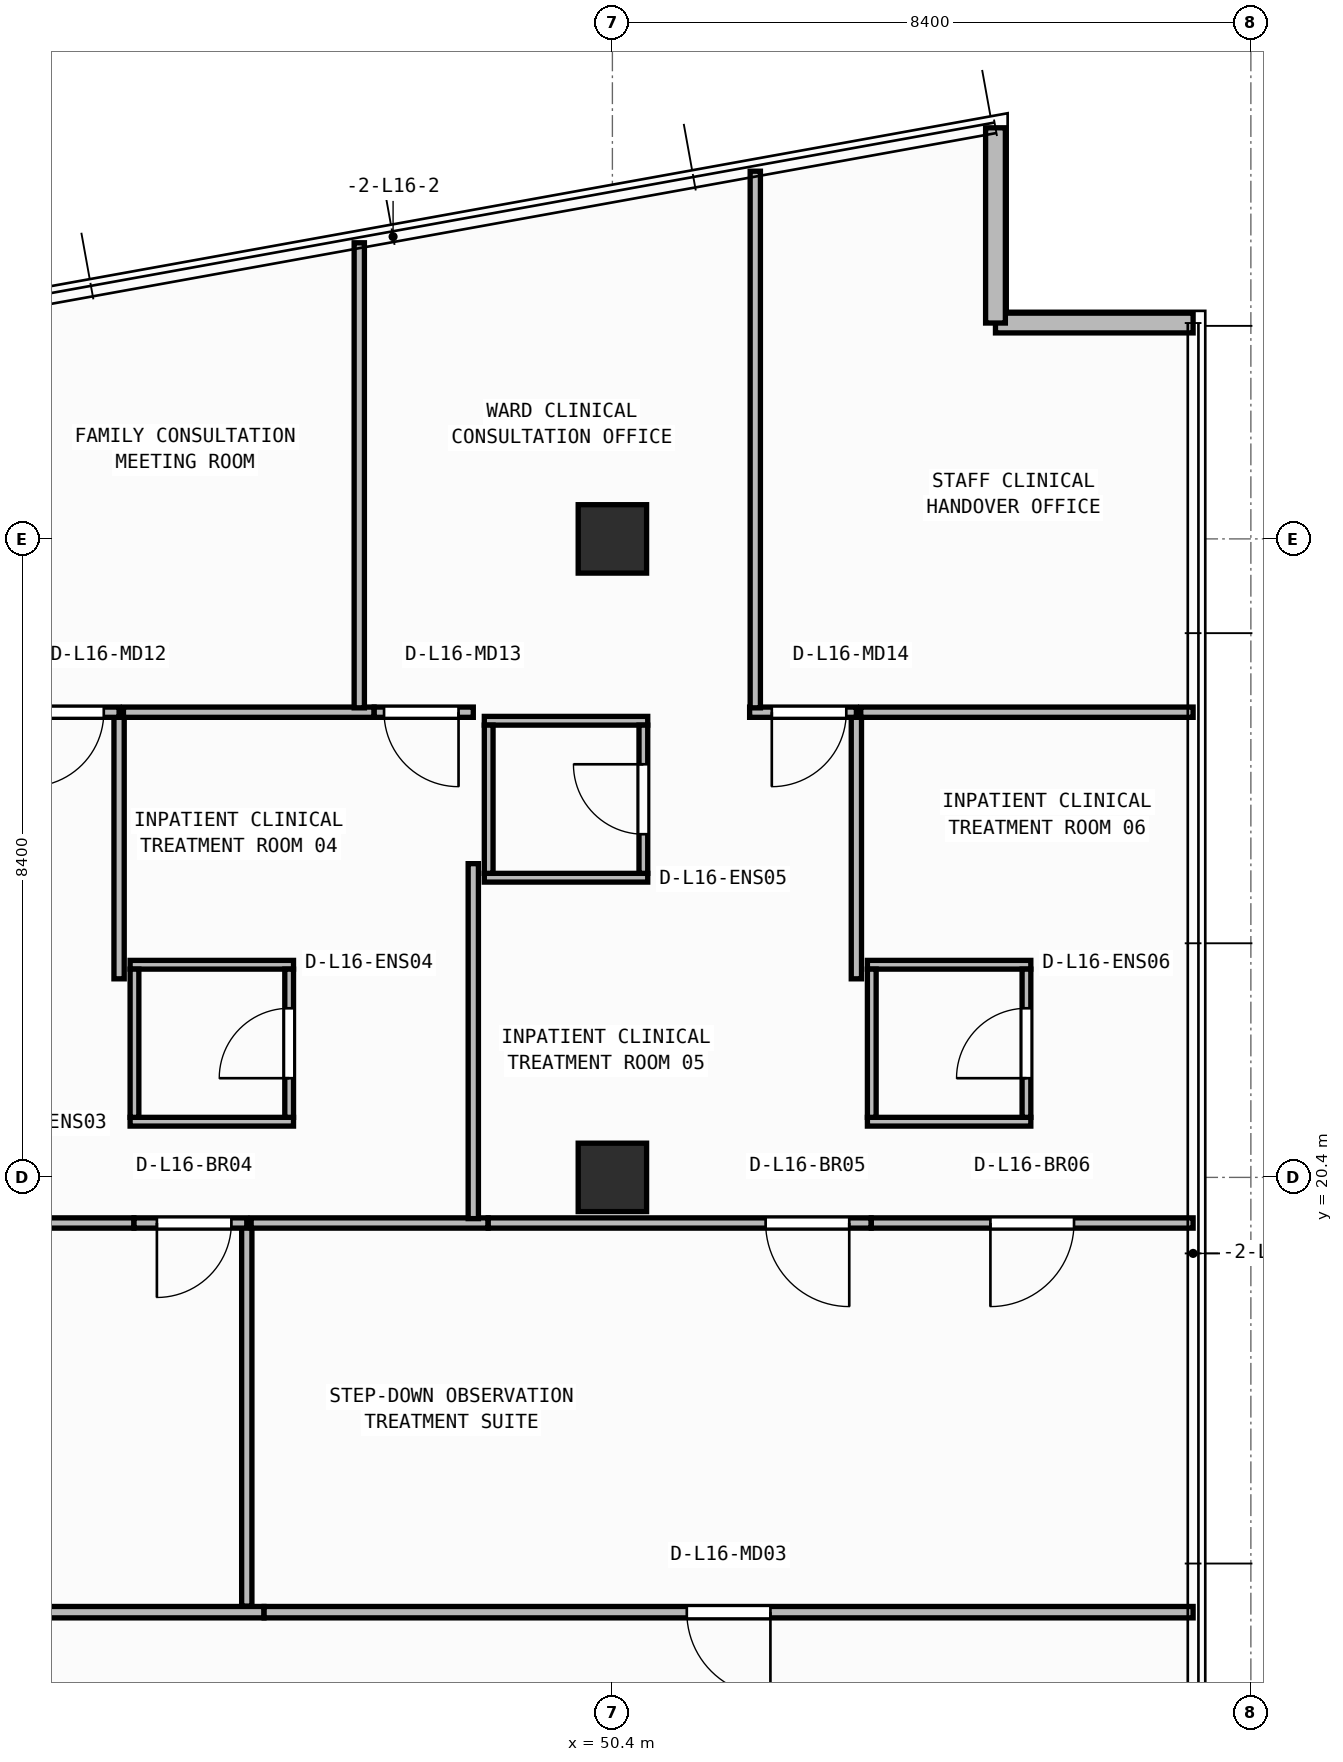
"""IFC4 building model, lengths in metres.
Left out: names, types, materials, properties, quantities, classifications, styles, units other than length and angle.
Written with IfcOpenShell. Run it as: python <this file> out.ifc"""

import sys

from ifc_helpers import new_model, si_unit, direction, frame, frame_2d, origin, origin_2d, place, context, subcontext, project, spatial, rectangle, extrude, element, fill, save


model = new_model("IFC4")
c1 = context("Model", 3, precision=1e-05, world=origin(), true_north=direction((0.0, 1.0)))
c2 = subcontext(c1, "Body", "Model", "MODEL_VIEW")
j1 = project(units=[si_unit("LENGTHUNIT", "METRE"), si_unit("PLANEANGLEUNIT", "RADIAN")], contexts=[c1])
p1 = place(None, origin())
s1 = spatial("IfcSite", under=j1, at=p1, CompositionType="ELEMENT")
p2 = place(p1, origin())
s2 = spatial("IfcBuilding", under=s1, at=p2, CompositionType="ELEMENT")
p3 = place(p2, frame((0.0, 0.0, 65.95)))
s3 = spatial("IfcBuildingStorey", under=s2, at=p3, CompositionType="ELEMENT", Elevation=65.95)
for number, where, z_axis, x_axis in (
    (1, (50.4, 20.4, 0.0), (0.0, 0.0, 1.0), (1.0, 0.0, 0.0)),
    (2, (50.4, 28.8, 0.0), (0.0, 0.0, 1.0), (1.0, 0.0, 0.0)),
):
    element("IfcColumn", number, at=place(p3, frame(where, z_axis=z_axis, x_axis=x_axis)), inside=s3, PredefinedType="COLUMN", context=c2, shape_type="SweptSolid", body=[
        extrude(rectangle(XDim=0.9, YDim=0.9, at=origin_2d()), origin(), (0.0, 0.0, 1.0), 3.95),
    ])
p4 = place(p3, frame((58.04, 31.64, 0.0), z_axis=(0.0, 0.0, 1.0), x_axis=(-1.0, 0.0, 0.0)))
e3 = element("IfcWall", 3, at=p4, inside=s3, PredefinedType="STANDARD", context=c2, shape_type="SweptSolid", body=[
    extrude(rectangle(XDim=2.6, YDim=0.26, at=frame_2d((1.3, 0.0))), origin(), (0.0, 0.0, 1.0), 3.71),
])
p5 = place(p3, frame((55.44, 31.64, 0.0), z_axis=(0.0, 0.0, 1.0), x_axis=(0.0, 1.0, 0.0)))
e4 = element("IfcWall", 4, at=p5, inside=s3, PredefinedType="STANDARD", context=c2, shape_type="SweptSolid", body=[
    extrude(rectangle(XDim=2.569, YDim=0.26, at=frame_2d((1.284, 0.0))), origin(), (0.0, 0.0, 1.0), 3.71),
])
for number, where, z_axis, x_axis in (
    (5, (44.055, 21.133, 0.0), (0.0, 0.0, 1.0), (1.0, 0.0, 0.0)),
    (6, (44.055, 23.198, 0.0), (0.0, 0.0, 1.0), (1.0, 0.0, 0.0)),
):
    element("IfcWall", number, at=place(p3, frame(where, z_axis=z_axis, x_axis=x_axis)), inside=s3, PredefinedType="PARTITIONING", context=c2, shape_type="SweptSolid", body=[
        extrude(rectangle(XDim=2.15, YDim=0.115, at=frame_2d((1.075, 0.0))), origin(), (0.0, 0.0, 1.0), 3.71),
    ])
p6 = place(p3, frame((44.113, 21.19, 0.0), z_axis=(0.0, 0.0, 1.0), x_axis=(0.0, 1.0, 0.0)))
e7 = element("IfcWall", 7, at=p6, inside=s3, PredefinedType="PARTITIONING", context=c2, shape_type="SweptSolid", body=[
    extrude(rectangle(XDim=1.95, YDim=0.115, at=frame_2d((0.975, 0.0))), origin(), (0.0, 0.0, 1.0), 3.71),
])
p7 = place(p3, frame((46.147, 21.19, 0.0), z_axis=(0.0, 0.0, 1.0), x_axis=(0.0, 1.0, 0.0)))
e8 = element("IfcWall", 8, at=p7, inside=s3, PredefinedType="PARTITIONING", context=c2, shape_type="SweptSolid", body=[
    extrude(rectangle(XDim=1.95, YDim=0.115, at=frame_2d((0.975, 0.0))), origin(), (0.0, 0.0, 1.0), 3.71),
])
p8 = place(p7, frame((0.515, 0.0, 0.0)))
e9 = element("IfcOpeningElement", 9, at=p8, cuts=e8, PredefinedType="OPENING", context=c2, shape_type="SweptSolid", body=[
    extrude(rectangle(XDim=0.92, YDim=2.1, at=frame_2d((0.46, 1.05))), frame((0.0, 0.067, 0.0), z_axis=(0.0, -1.0, 0.0), x_axis=(1.0, 0.0, 0.0)), (0.0, 0.0, 1.0), 0.135),
])
p9 = place(p3, frame((48.715, 24.343, 0.0), z_axis=(0.0, 0.0, 1.0), x_axis=(1.0, 0.0, 0.0)))
e10 = element("IfcWall", 10, at=p9, inside=s3, PredefinedType="PARTITIONING", context=c2, shape_type="SweptSolid", body=[
    extrude(rectangle(XDim=2.15, YDim=0.115, at=frame_2d((1.075, 0.0))), origin(), (0.0, 0.0, 1.0), 3.378),
])
p10 = place(p3, frame((48.715, 26.407, 0.0), z_axis=(0.0, 0.0, 1.0), x_axis=(1.0, 0.0, 0.0)))
e11 = element("IfcWall", 11, at=p10, inside=s3, PredefinedType="PARTITIONING", context=c2, shape_type="SweptSolid", body=[
    extrude(rectangle(XDim=2.15, YDim=0.115, at=frame_2d((1.075, 0.0))), origin(), (0.0, 0.0, 1.0), 3.71),
])
p11 = place(p3, frame((48.772, 24.4, 0.0), z_axis=(0.0, 0.0, 1.0), x_axis=(0.0, 1.0, 0.0)))
e12 = element("IfcWall", 12, at=p11, inside=s3, PredefinedType="PARTITIONING", context=c2, shape_type="SweptSolid", body=[
    extrude(rectangle(XDim=1.95, YDim=0.115, at=frame_2d((0.975, 0.0))), origin(), (0.0, 0.0, 1.0), 3.71),
])
p12 = place(p3, frame((50.808, 24.4, 0.0), z_axis=(0.0, 0.0, 1.0), x_axis=(0.0, 1.0, 0.0)))
e13 = element("IfcWall", 13, at=p12, inside=s3, PredefinedType="PARTITIONING", context=c2, shape_type="SweptSolid", body=[
    extrude(rectangle(XDim=1.95, YDim=0.115, at=frame_2d((0.975, 0.0))), origin(), (0.0, 0.0, 1.0), 3.073),
])
p13 = place(p12, frame((0.515, 0.0, 0.0)))
e14 = element("IfcOpeningElement", 14, at=p13, cuts=e13, PredefinedType="OPENING", context=c2, shape_type="SweptSolid", body=[
    extrude(rectangle(XDim=0.92, YDim=2.1, at=frame_2d((0.46, 1.05))), frame((0.0, 0.067, 0.0), z_axis=(0.0, -1.0, 0.0), x_axis=(1.0, 0.0, 0.0)), (0.0, 0.0, 1.0), 0.135),
])
for number, where, z_axis, x_axis in (
    (15, (53.755, 21.133, 0.0), (0.0, 0.0, 1.0), (1.0, 0.0, 0.0)),
    (16, (53.755, 23.198, 0.0), (0.0, 0.0, 1.0), (1.0, 0.0, 0.0)),
):
    element("IfcWall", number, at=place(p3, frame(where, z_axis=z_axis, x_axis=x_axis)), inside=s3, PredefinedType="PARTITIONING", context=c2, shape_type="SweptSolid", body=[
        extrude(rectangle(XDim=2.15, YDim=0.115, at=frame_2d((1.075, 0.0))), origin(), (0.0, 0.0, 1.0), 3.71),
    ])
p14 = place(p3, frame((53.812, 21.19, 0.0), z_axis=(0.0, 0.0, 1.0), x_axis=(0.0, 1.0, 0.0)))
e17 = element("IfcWall", 17, at=p14, inside=s3, PredefinedType="PARTITIONING", context=c2, shape_type="SweptSolid", body=[
    extrude(rectangle(XDim=1.95, YDim=0.115, at=frame_2d((0.975, 0.0))), origin(), (0.0, 0.0, 1.0), 3.71),
])
p15 = place(p3, frame((55.847, 21.19, 0.0), z_axis=(0.0, 0.0, 1.0), x_axis=(0.0, 1.0, 0.0)))
e18 = element("IfcWall", 18, at=p15, inside=s3, PredefinedType="PARTITIONING", context=c2, shape_type="SweptSolid", body=[
    extrude(rectangle(XDim=1.95, YDim=0.115, at=frame_2d((0.975, 0.0))), origin(), (0.0, 0.0, 1.0), 3.71),
])
p16 = place(p15, frame((0.515, 0.0, 0.0)))
e19 = element("IfcOpeningElement", 19, at=p16, cuts=e18, PredefinedType="OPENING", context=c2, shape_type="SweptSolid", body=[
    extrude(rectangle(XDim=0.92, YDim=2.1, at=frame_2d((0.46, 1.05))), frame((0.0, 0.067, 0.0), z_axis=(0.0, -1.0, 0.0), x_axis=(1.0, 0.0, 0.0)), (0.0, 0.0, 1.0), 0.135),
])
p17 = place(p3, frame((45.816, 14.68, 0.0), z_axis=(0.0, 0.0, 1.0), x_axis=(-1.0, 0.0, 0.0)))
e20 = element("IfcWall", 20, at=p17, inside=s3, PredefinedType="PARTITIONING", context=c2, shape_type="SweptSolid", body=[
    extrude(rectangle(XDim=16.062, YDim=0.15, at=frame_2d((8.031, 0.0))), origin(), (0.0, 0.0, 1.0), 3.71),
])
p18 = place(p17, frame((7.481, 0.0, 0.0)))
e21 = element("IfcOpeningElement", 21, at=p18, cuts=e20, PredefinedType="OPENING", context=c2, shape_type="SweptSolid", body=[
    extrude(rectangle(XDim=1.1, YDim=2.1, at=frame_2d((0.55, 1.05))), frame((0.0, 0.085, 0.0), z_axis=(0.0, -1.0, 0.0), x_axis=(1.0, 0.0, 0.0)), (0.0, 0.0, 1.0), 0.17),
])
p19 = place(p3, frame((58.04, 14.68, 0.0), z_axis=(0.0, 0.0, 1.0), x_axis=(-1.0, 0.0, 0.0)))
e22 = element("IfcWall", 22, at=p19, inside=s3, PredefinedType="PARTITIONING", context=c2, shape_type="SweptSolid", body=[
    extrude(rectangle(XDim=12.222, YDim=0.15, at=frame_2d((6.111, 0.0))), origin(), (0.0, 0.0, 1.0), 3.71),
])
p20 = place(p19, frame((5.561, 0.0, 0.0)))
e23 = element("IfcOpeningElement", 23, at=p20, cuts=e22, PredefinedType="OPENING", context=c2, shape_type="SweptSolid", body=[
    extrude(rectangle(XDim=1.1, YDim=2.1, at=frame_2d((0.55, 1.05))), frame((0.0, 0.085, 0.0), z_axis=(0.0, -1.0, 0.0), x_axis=(1.0, 0.0, 0.0)), (0.0, 0.0, 1.0), 0.17),
])
p21 = place(p3, frame((45.59, 14.76, 0.0), z_axis=(0.0, 0.0, 1.0), x_axis=(0.0, 1.0, 0.0)))
e24 = element("IfcWall", 24, at=p21, inside=s3, PredefinedType="PARTITIONING", context=c2, shape_type="SweptSolid", body=[
    extrude(rectangle(XDim=5.04, YDim=0.135, at=frame_2d((2.52, 0.0))), origin(), (0.0, 0.0, 1.0), 3.71),
])
p22 = place(p3, frame((44.104, 19.8, 0.0), z_axis=(0.0, 0.0, 1.0), x_axis=(-1.0, 0.0, 0.0)))
e25 = element("IfcWall", 25, at=p22, inside=s3, PredefinedType="PARTITIONING", context=c2, shape_type="SweptSolid", body=[
    extrude(rectangle(XDim=4.288, YDim=0.135, at=frame_2d((2.144, 0.0))), origin(), (0.0, 0.0, 1.0), 3.71),
])
p23 = place(p3, frame((45.59, 19.8, 0.0), z_axis=(0.0, 0.0, 1.0), x_axis=(-1.0, 0.0, 0.0)))
e26 = element("IfcWall", 26, at=p23, inside=s3, PredefinedType="PARTITIONING", context=c2, shape_type="SweptSolid", body=[
    extrude(rectangle(XDim=1.483, YDim=0.135, at=frame_2d((0.742, 0.0))), origin(), (0.0, 0.0, 1.0), 3.71),
])
p24 = place(p23, frame((0.203, 0.0, 0.0)))
e27 = element("IfcOpeningElement", 27, at=p24, cuts=e26, PredefinedType="OPENING", context=c2, shape_type="SweptSolid", body=[
    extrude(rectangle(XDim=0.98, YDim=2.1, at=frame_2d((0.49, 1.05))), frame((0.0, 0.077, 0.0), z_axis=(0.0, -1.0, 0.0), x_axis=(1.0, 0.0, 0.0)), (0.0, 0.0, 1.0), 0.155),
])
p25 = place(p3, frame((48.765, 19.8, 0.0), z_axis=(0.0, 0.0, 1.0), x_axis=(-1.0, 0.0, 0.0)))
e28 = element("IfcWall", 28, at=p25, inside=s3, PredefinedType="PARTITIONING", context=c2, shape_type="SweptSolid", body=[
    extrude(rectangle(XDim=3.117, YDim=0.135, at=frame_2d((1.559, 0.0))), origin(), (0.0, 0.0, 1.0), 3.71),
])
p26 = place(p3, frame((53.805, 19.8, 0.0), z_axis=(0.0, 0.0, 1.0), x_axis=(-1.0, 0.0, 0.0)))
e29 = element("IfcWall", 29, at=p26, inside=s3, PredefinedType="PARTITIONING", context=c2, shape_type="SweptSolid", body=[
    extrude(rectangle(XDim=5.038, YDim=0.135, at=frame_2d((2.519, 0.0))), origin(), (0.0, 0.0, 1.0), 3.71),
])
p27 = place(p26, frame((0.289, 0.0, 0.0)))
e30 = element("IfcOpeningElement", 30, at=p27, cuts=e29, PredefinedType="OPENING", context=c2, shape_type="SweptSolid", body=[
    extrude(rectangle(XDim=1.1, YDim=2.1, at=frame_2d((0.55, 1.05))), frame((0.0, 0.077, 0.0), z_axis=(0.0, -1.0, 0.0), x_axis=(1.0, 0.0, 0.0)), (0.0, 0.0, 1.0), 0.155),
])
p28 = place(p3, frame((58.04, 19.8, 0.0), z_axis=(0.0, 0.0, 1.0), x_axis=(-1.0, 0.0, 0.0)))
e31 = element("IfcWall", 31, at=p28, inside=s3, PredefinedType="PARTITIONING", context=c2, shape_type="SweptSolid", body=[
    extrude(rectangle(XDim=4.233, YDim=0.135, at=frame_2d((2.117, 0.0))), origin(), (0.0, 0.0, 1.0), 3.71),
])
p29 = place(p28, frame((1.567, 0.0, 0.0)))
e32 = element("IfcOpeningElement", 32, at=p29, cuts=e31, PredefinedType="OPENING", context=c2, shape_type="SweptSolid", body=[
    extrude(rectangle(XDim=1.1, YDim=2.1, at=frame_2d((0.55, 1.05))), frame((0.0, 0.077, 0.0), z_axis=(0.0, -1.0, 0.0), x_axis=(1.0, 0.0, 0.0)), (0.0, 0.0, 1.0), 0.155),
])
p30 = place(p3, frame((43.91, 23.012, 0.0), z_axis=(0.0, 0.0, 1.0), x_axis=(0.0, 1.0, 0.0)))
e33 = element("IfcWall", 33, at=p30, inside=s3, PredefinedType="PARTITIONING", context=c2, shape_type="SweptSolid", body=[
    extrude(rectangle(XDim=3.508, YDim=0.135, at=frame_2d((1.754, 0.0))), origin(), (0.0, 0.0, 1.0), 3.71),
])
p31 = place(p3, frame((43.91, 26.52, 0.0), z_axis=(0.0, 0.0, 1.0), x_axis=(-1.0, 0.0, 0.0)))
e34 = element("IfcWall", 34, at=p31, inside=s3, PredefinedType="PARTITIONING", context=c2, shape_type="SweptSolid", body=[
    extrude(rectangle(XDim=1.433, YDim=0.135, at=frame_2d((0.717, 0.0))), origin(), (0.0, 0.0, 1.0), 3.71),
])
p32 = place(p31, frame((0.201, 0.0, 0.0)))
e35 = element("IfcOpeningElement", 35, at=p32, cuts=e34, PredefinedType="OPENING", context=c2, shape_type="SweptSolid", body=[
    extrude(rectangle(XDim=0.98, YDim=2.1, at=frame_2d((0.49, 1.05))), frame((0.0, 0.077, 0.0), z_axis=(0.0, -1.0, 0.0), x_axis=(1.0, 0.0, 0.0)), (0.0, 0.0, 1.0), 0.155),
])
p33 = place(p3, frame((48.57, 19.857, 0.0), z_axis=(0.0, 0.0, 1.0), x_axis=(0.0, 1.0, 0.0)))
e36 = element("IfcWall", 36, at=p33, inside=s3, PredefinedType="PARTITIONING", context=c2, shape_type="SweptSolid", body=[
    extrude(rectangle(XDim=4.67, YDim=0.135, at=frame_2d((2.335, 0.0))), origin(), (0.0, 0.0, 1.0), 3.71),
])
p34 = place(p3, frame((47.265, 26.52, 0.0), z_axis=(0.0, 0.0, 1.0), x_axis=(-1.0, 0.0, 0.0)))
e37 = element("IfcWall", 37, at=p34, inside=s3, PredefinedType="PARTITIONING", context=c2, shape_type="SweptSolid", body=[
    extrude(rectangle(XDim=3.297, YDim=0.135, at=frame_2d((1.648, 0.0))), origin(), (0.0, 0.0, 1.0), 3.71),
])
p35 = place(p3, frame((48.57, 26.52, 0.0), z_axis=(0.0, 0.0, 1.0), x_axis=(-1.0, 0.0, 0.0)))
e38 = element("IfcWall", 38, at=p35, inside=s3, PredefinedType="PARTITIONING", context=c2, shape_type="SweptSolid", body=[
    extrude(rectangle(XDim=1.303, YDim=0.135, at=frame_2d((0.652, 0.0))), origin(), (0.0, 0.0, 1.0), 3.71),
])
p36 = place(p35, frame((0.194, 0.0, 0.0)))
e39 = element("IfcOpeningElement", 39, at=p36, cuts=e38, PredefinedType="OPENING", context=c2, shape_type="SweptSolid", body=[
    extrude(rectangle(XDim=0.98, YDim=2.1, at=frame_2d((0.49, 1.05))), frame((0.0, 0.077, 0.0), z_axis=(0.0, -1.0, 0.0), x_axis=(1.0, 0.0, 0.0)), (0.0, 0.0, 1.0), 0.155),
])
p37 = place(p3, frame((53.61, 23.012, 0.0), z_axis=(0.0, 0.0, 1.0), x_axis=(0.0, 1.0, 0.0)))
e40 = element("IfcWall", 40, at=p37, inside=s3, PredefinedType="PARTITIONING", context=c2, shape_type="SweptSolid", body=[
    extrude(rectangle(XDim=3.508, YDim=0.135, at=frame_2d((1.754, 0.0))), origin(), (0.0, 0.0, 1.0), 3.71),
])
p38 = place(p3, frame((53.61, 26.52, 0.0), z_axis=(0.0, 0.0, 1.0), x_axis=(-1.0, 0.0, 0.0)))
e41 = element("IfcWall", 41, at=p38, inside=s3, PredefinedType="PARTITIONING", context=c2, shape_type="SweptSolid", body=[
    extrude(rectangle(XDim=1.405, YDim=0.135, at=frame_2d((0.702, 0.0))), origin(), (0.0, 0.0, 1.0), 3.71),
])
p39 = place(p38, frame((0.133, 0.0, 0.0)))
e42 = element("IfcOpeningElement", 42, at=p39, cuts=e41, PredefinedType="OPENING", context=c2, shape_type="SweptSolid", body=[
    extrude(rectangle(XDim=0.98, YDim=2.1, at=frame_2d((0.49, 1.05))), frame((0.0, 0.077, 0.0), z_axis=(0.0, -1.0, 0.0), x_axis=(1.0, 0.0, 0.0)), (0.0, 0.0, 1.0), 0.155),
])
p40 = place(p3, frame((58.04, 26.52, 0.0), z_axis=(0.0, 0.0, 1.0), x_axis=(-1.0, 0.0, 0.0)))
e43 = element("IfcWall", 43, at=p40, inside=s3, PredefinedType="PARTITIONING", context=c2, shape_type="SweptSolid", body=[
    extrude(rectangle(XDim=4.373, YDim=0.135, at=frame_2d((2.186, 0.0))), origin(), (0.0, 0.0, 1.0), 3.71),
])
p41 = place(p3, frame((47.07, 26.577, 0.0), z_axis=(0.0, 0.0, 1.0), x_axis=(0.0, 1.0, 0.0)))
e44 = element("IfcWall", 44, at=p41, inside=s3, PredefinedType="PARTITIONING", context=c2, shape_type="SweptSolid", body=[
    extrude(rectangle(XDim=6.118, YDim=0.135, at=frame_2d((3.059, 0.0))), origin(), (0.0, 0.0, 1.0), 3.71),
])
p42 = place(p3, frame((52.28, 26.577, 0.0), z_axis=(0.0, 0.0, 1.0), x_axis=(0.0, 1.0, 0.0)))
e45 = element("IfcWall", 45, at=p42, inside=s3, PredefinedType="PARTITIONING", context=c2, shape_type="SweptSolid", body=[
    extrude(rectangle(XDim=7.06, YDim=0.135, at=frame_2d((3.53, 0.0))), origin(), (0.0, 0.0, 1.0), 3.71),
])
p43 = place(p8, origin())
e46 = element("IfcDoor", 46, at=p43, inside=s3, OperationType="SINGLE_SWING_LEFT", PredefinedType="DOOR", context=c2, shape_type="SweptSolid", body=[
    extrude(rectangle(XDim=0.92, YDim=2.1, at=frame_2d((0.46, 1.05))), frame((0.0, 0.025, 0.0), z_axis=(0.0, -1.0, 0.0), x_axis=(1.0, 0.0, 0.0)), (0.0, 0.0, 1.0), 0.05),
])
fill(e9, e46)
p44 = place(p13, origin())
e47 = element("IfcDoor", 47, at=p44, inside=s3, OperationType="SINGLE_SWING_RIGHT", PredefinedType="DOOR", context=c2, shape_type="SweptSolid", body=[
    extrude(rectangle(XDim=0.92, YDim=2.1, at=frame_2d((0.46, 1.05))), frame((0.0, 0.025, 0.0), z_axis=(0.0, -1.0, 0.0), x_axis=(1.0, 0.0, 0.0)), (0.0, 0.0, 1.0), 0.05),
])
fill(e14, e47)
p45 = place(p16, origin())
e48 = element("IfcDoor", 48, at=p45, inside=s3, OperationType="SINGLE_SWING_LEFT", PredefinedType="DOOR", context=c2, shape_type="SweptSolid", body=[
    extrude(rectangle(XDim=0.92, YDim=2.1, at=frame_2d((0.46, 1.05))), frame((0.0, 0.025, 0.0), z_axis=(0.0, -1.0, 0.0), x_axis=(1.0, 0.0, 0.0)), (0.0, 0.0, 1.0), 0.05),
])
fill(e19, e48)
p46 = place(p20, origin())
e49 = element("IfcDoor", 49, at=p46, inside=s3, OperationType="SINGLE_SWING_LEFT", PredefinedType="DOOR", context=c2, shape_type="SweptSolid", body=[
    extrude(rectangle(XDim=1.1, YDim=2.1, at=frame_2d((0.55, 1.05))), frame((0.0, 0.025, 0.0), z_axis=(0.0, -1.0, 0.0), x_axis=(1.0, 0.0, 0.0)), (0.0, 0.0, 1.0), 0.05),
])
fill(e23, e49)
p47 = place(p24, origin())
e50 = element("IfcDoor", 50, at=p47, inside=s3, OperationType="SINGLE_SWING_RIGHT", PredefinedType="DOOR", context=c2, shape_type="SweptSolid", body=[
    extrude(rectangle(XDim=0.98, YDim=2.1, at=frame_2d((0.49, 1.05))), frame((0.0, 0.025, 0.0), z_axis=(0.0, -1.0, 0.0), x_axis=(1.0, 0.0, 0.0)), (0.0, 0.0, 1.0), 0.05),
])
fill(e27, e50)
p48 = place(p27, origin())
e51 = element("IfcDoor", 51, at=p48, inside=s3, OperationType="SINGLE_SWING_LEFT", PredefinedType="DOOR", context=c2, shape_type="SweptSolid", body=[
    extrude(rectangle(XDim=1.1, YDim=2.1, at=frame_2d((0.55, 1.05))), frame((0.0, 0.025, 0.0), z_axis=(0.0, -1.0, 0.0), x_axis=(1.0, 0.0, 0.0)), (0.0, 0.0, 1.0), 0.05),
])
fill(e30, e51)
p49 = place(p29, origin())
e52 = element("IfcDoor", 52, at=p49, inside=s3, OperationType="SINGLE_SWING_RIGHT", PredefinedType="DOOR", context=c2, shape_type="SweptSolid", body=[
    extrude(rectangle(XDim=1.1, YDim=2.1, at=frame_2d((0.55, 1.05))), frame((0.0, 0.025, 0.0), z_axis=(0.0, -1.0, 0.0), x_axis=(1.0, 0.0, 0.0)), (0.0, 0.0, 1.0), 0.05),
])
fill(e32, e52)
p50 = place(p32, origin())
e53 = element("IfcDoor", 53, at=p50, inside=s3, OperationType="SINGLE_SWING_RIGHT", PredefinedType="DOOR", context=c2, shape_type="SweptSolid", body=[
    extrude(rectangle(XDim=0.98, YDim=2.1, at=frame_2d((0.49, 1.05))), frame((0.0, 0.025, 0.0), z_axis=(0.0, -1.0, 0.0), x_axis=(1.0, 0.0, 0.0)), (0.0, 0.0, 1.0), 0.05),
])
fill(e35, e53)
p51 = place(p36, origin())
e54 = element("IfcDoor", 54, at=p51, inside=s3, OperationType="SINGLE_SWING_LEFT", PredefinedType="DOOR", context=c2, shape_type="SweptSolid", body=[
    extrude(rectangle(XDim=0.98, YDim=2.1, at=frame_2d((0.49, 1.05))), frame((0.0, 0.025, 0.0), z_axis=(0.0, -1.0, 0.0), x_axis=(1.0, 0.0, 0.0)), (0.0, 0.0, 1.0), 0.05),
])
fill(e39, e54)
p52 = place(p39, origin())
e55 = element("IfcDoor", 55, at=p52, inside=s3, OperationType="SINGLE_SWING_RIGHT", PredefinedType="DOOR", context=c2, shape_type="SweptSolid", body=[
    extrude(rectangle(XDim=0.98, YDim=2.1, at=frame_2d((0.49, 1.05))), frame((0.0, 0.025, 0.0), z_axis=(0.0, -1.0, 0.0), x_axis=(1.0, 0.0, 0.0)), (0.0, 0.0, 1.0), 0.05),
])
fill(e42, e55)
save(model, sys.argv[1])
